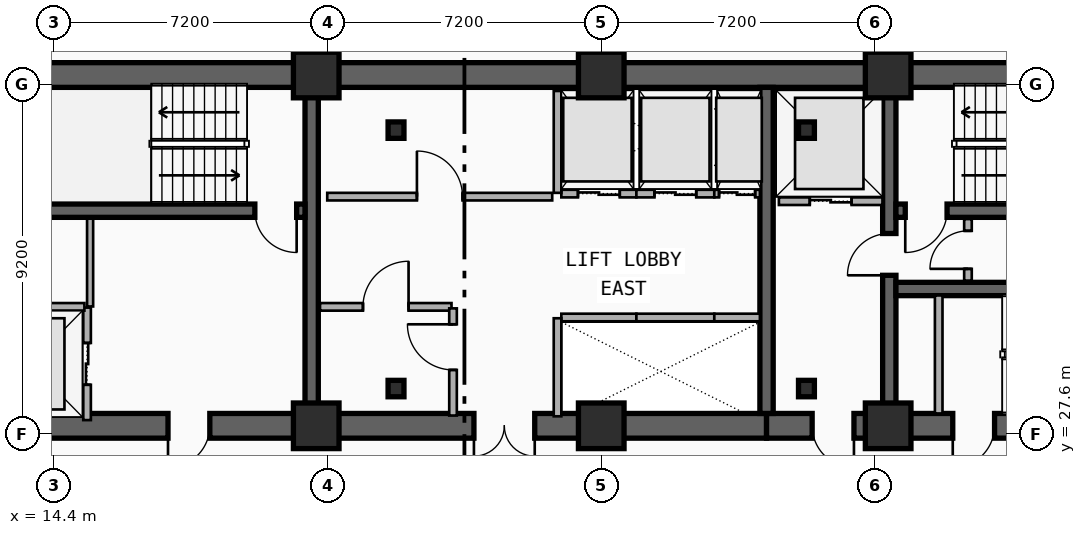
"""IFC4 building model, lengths in metres.
Left out: names, types, materials, properties, quantities, classifications, styles, units other than length and angle.
Written with IfcOpenShell. Run it as: python <this file> out.ifc"""

import sys

from ifc_helpers import new_model, si_unit, direction, frame, frame_2d, origin, origin_2d, place, context, subcontext, project, spatial, rectangle, i_section, extrude, element, fill, save


model = new_model("IFC4")
c1 = context("Model", 3, precision=1e-05, world=origin(), true_north=direction((0.0, 1.0)))
c2 = subcontext(c1, "Body", "Model", "MODEL_VIEW")
j1 = project(units=[si_unit("LENGTHUNIT", "METRE"), si_unit("PLANEANGLEUNIT", "RADIAN")], contexts=[c1])
p1 = place(None, origin())
s1 = spatial("IfcSite", under=j1, at=p1, CompositionType="ELEMENT")
p2 = place(p1, origin())
s2 = spatial("IfcBuilding", under=s1, at=p2, CompositionType="ELEMENT")
p3 = place(p2, frame((0.0, 0.0, 118.8)))
s3 = spatial("IfcBuildingStorey", under=s2, at=p3, CompositionType="ELEMENT", Elevation=118.8)
p4 = place(p3, frame((12.15, 37.05, 0.0), z_axis=(0.0, 0.0, 1.0), x_axis=(1.0, 0.0, 0.0)))
e1 = element("IfcWall", 1, at=p4, inside=s3, PredefinedType="SHEAR", context=c2, shape_type="SweptSolid", body=[
    extrude(rectangle(XDim=33.23, YDim=0.65, at=frame_2d((16.615, 0.0))), origin(), (0.0, 0.0, 1.0), 3.5),
])
p5 = place(p3, frame((21.18, 27.82, 0.0), z_axis=(0.0, 0.0, 1.0), x_axis=(-1.0, 0.0, 0.0)))
e2 = element("IfcWall", 2, at=p5, inside=s3, PredefinedType="SHEAR", context=c2, shape_type="SweptSolid", body=[
    extrude(rectangle(XDim=9.03, YDim=0.65, at=frame_2d((4.515, 0.0))), origin(), (0.0, 0.0, 1.0), 3.5),
])
p6 = place(p5, frame((2.68, 0.0, 0.0)))
e3 = element("IfcOpeningElement", 3, at=p6, cuts=e2, PredefinedType="OPENING", context=c2, shape_type="SweptSolid", body=[
    extrude(rectangle(XDim=1.1, YDim=2.15, at=frame_2d((0.55, 1.075))), frame((0.0, 0.335, 0.0), z_axis=(0.0, -1.0, 0.0), x_axis=(1.0, 0.0, 0.0)), (0.0, 0.0, 1.0), 0.67),
])
p7 = place(p3, frame((33.15, 27.82, 0.0), z_axis=(0.0, 0.0, 1.0), x_axis=(-1.0, 0.0, 0.0)))
e4 = element("IfcWall", 4, at=p7, inside=s3, PredefinedType="SHEAR", context=c2, shape_type="SweptSolid", body=[
    extrude(rectangle(XDim=11.97, YDim=0.65, at=frame_2d((5.985, 0.0))), origin(), (0.0, 0.0, 1.0), 3.5),
])
p8 = place(p7, frame((6.1, 0.0, 0.0)))
e5 = element("IfcOpeningElement", 5, at=p8, cuts=e4, PredefinedType="OPENING", context=c2, shape_type="SweptSolid", body=[
    extrude(rectangle(XDim=1.6, YDim=2.2, at=frame_2d((0.8, 1.1))), frame((0.0, 0.335, 0.0), z_axis=(0.0, -1.0, 0.0), x_axis=(1.0, 0.0, 0.0)), (0.0, 0.0, 1.0), 0.67),
])
p9 = place(p3, frame((45.38, 27.82, 0.0), z_axis=(0.0, 0.0, 1.0), x_axis=(-1.0, 0.0, 0.0)))
e6 = element("IfcWall", 6, at=p9, inside=s3, PredefinedType="SHEAR", context=c2, shape_type="SweptSolid", body=[
    extrude(rectangle(XDim=12.23, YDim=0.65, at=frame_2d((6.115, 0.0))), origin(), (0.0, 0.0, 1.0), 3.5),
])
p10 = place(p9, frame((9.93, 0.0, 0.0)))
e7 = element("IfcOpeningElement", 7, at=p10, cuts=e6, PredefinedType="OPENING", context=c2, shape_type="SweptSolid", body=[
    extrude(rectangle(XDim=1.1, YDim=2.15, at=frame_2d((0.55, 1.075))), frame((0.0, 0.335, 0.0), z_axis=(0.0, -1.0, 0.0), x_axis=(1.0, 0.0, 0.0)), (0.0, 0.0, 1.0), 0.67),
])
p11 = place(p9, frame((6.23, 0.0, 0.0)))
e8 = element("IfcOpeningElement", 8, at=p11, cuts=e6, PredefinedType="OPENING", context=c2, shape_type="SweptSolid", body=[
    extrude(rectangle(XDim=1.1, YDim=2.15, at=frame_2d((0.55, 1.075))), frame((0.0, 0.335, 0.0), z_axis=(0.0, -1.0, 0.0), x_axis=(1.0, 0.0, 0.0)), (0.0, 0.0, 1.0), 0.67),
])
for number, where, z_axis, x_axis in (
    (9, (21.18, 28.145, 0.0), (0.0, 0.0, 1.0), (0.0, 1.0, 0.0)),
    (10, (33.15, 28.145, 0.0), (0.0, 0.0, 1.0), (0.0, 1.0, 0.0)),
):
    element("IfcWall", number, at=place(p3, frame(where, z_axis=z_axis, x_axis=x_axis)), inside=s3, PredefinedType="SHEAR", context=c2, shape_type="SweptSolid", body=[
        extrude(rectangle(XDim=8.58, YDim=0.35, at=frame_2d((4.29, 0.0))), origin(), (0.0, 0.0, 1.0), 3.5),
    ])
p12 = place(p3, frame((36.38, 28.145, 0.0), z_axis=(0.0, 0.0, 1.0), x_axis=(0.0, 1.0, 0.0)))
e11 = element("IfcWall", 11, at=p12, inside=s3, PredefinedType="SHEAR", context=c2, shape_type="SweptSolid", body=[
    extrude(rectangle(XDim=8.58, YDim=0.35, at=frame_2d((4.29, 0.0))), origin(), (0.0, 0.0, 1.0), 3.5),
])
p13 = place(p12, frame((3.635, 0.0, 0.0)))
e12 = element("IfcOpeningElement", 12, at=p13, cuts=e11, PredefinedType="OPENING", context=c2, shape_type="SweptSolid", body=[
    extrude(rectangle(XDim=1.1, YDim=2.15, at=frame_2d((0.55, 1.075))), frame((0.0, 0.185, 0.0), z_axis=(0.0, -1.0, 0.0), x_axis=(1.0, 0.0, 0.0)), (0.0, 0.0, 1.0), 0.37),
])
p14 = place(p3, frame((21.005, 33.48, 0.0), z_axis=(0.0, 0.0, 1.0), x_axis=(-1.0, 0.0, 0.0)))
e13 = element("IfcWall", 13, at=p14, inside=s3, PredefinedType="SHEAR", context=c2, shape_type="SweptSolid", body=[
    extrude(rectangle(XDim=8.53, YDim=0.35, at=frame_2d((4.265, 0.0))), origin(), (0.0, 0.0, 1.0), 3.5),
])
p15 = place(p14, frame((0.22, 0.0, 0.0)))
e14 = element("IfcOpeningElement", 14, at=p15, cuts=e13, PredefinedType="OPENING", context=c2, shape_type="SweptSolid", body=[
    extrude(rectangle(XDim=1.1, YDim=2.15, at=frame_2d((0.55, 1.075))), frame((0.0, 0.185, 0.0), z_axis=(0.0, -1.0, 0.0), x_axis=(1.0, 0.0, 0.0)), (0.0, 0.0, 1.0), 0.37),
])
p16 = place(p3, frame((45.055, 33.48, 0.0), z_axis=(0.0, 0.0, 1.0), x_axis=(-1.0, 0.0, 0.0)))
e15 = element("IfcWall", 15, at=p16, inside=s3, PredefinedType="SHEAR", context=c2, shape_type="SweptSolid", body=[
    extrude(rectangle(XDim=8.5, YDim=0.35, at=frame_2d((4.25, 0.0))), origin(), (0.0, 0.0, 1.0), 3.5),
])
p17 = place(p16, frame((7.155, 0.0, 0.0)))
e16 = element("IfcOpeningElement", 16, at=p17, cuts=e15, PredefinedType="OPENING", context=c2, shape_type="SweptSolid", body=[
    extrude(rectangle(XDim=1.1, YDim=2.15, at=frame_2d((0.55, 1.075))), frame((0.0, 0.185, 0.0), z_axis=(0.0, -1.0, 0.0), x_axis=(1.0, 0.0, 0.0)), (0.0, 0.0, 1.0), 0.37),
])
p18 = place(p3, frame((36.555, 31.42, 0.0), z_axis=(0.0, 0.0, 1.0), x_axis=(1.0, 0.0, 0.0)))
e17 = element("IfcWall", 17, at=p18, inside=s3, PredefinedType="SHEAR", context=c2, shape_type="SweptSolid", body=[
    extrude(rectangle(XDim=8.5, YDim=0.35, at=frame_2d((4.25, 0.0))), origin(), (0.0, 0.0, 1.0), 3.5),
])
for number, where, z_axis, x_axis in (
    (18, (23.4, 28.8, 0.0), (0.0, 0.0, 1.0), (1.0, 0.0, 0.0)),
    (19, (34.2, 28.8, 0.0), (0.0, 0.0, 1.0), (1.0, 0.0, 0.0)),
    (20, (34.2, 35.6, 0.0), (0.0, 0.0, 1.0), (1.0, 0.0, 0.0)),
    (21, (23.4, 35.6, 0.0), (0.0, 0.0, 1.0), (1.0, 0.0, 0.0)),
):
    element("IfcColumn", number, at=place(p3, frame(where, z_axis=z_axis, x_axis=x_axis)), inside=s3, PredefinedType="COLUMN", context=c2, shape_type="SweptSolid", body=[
        extrude(i_section(OverallWidth=0.418, OverallDepth=0.432, WebThickness=0.035, FlangeThickness=0.056, FilletRadius=0.015, at=origin_2d()), origin(), (0.0, 0.0, 1.0), 3.5),
    ])
for number, where, z_axis, x_axis in (
    (22, (21.3, 27.82, 0.0), (0.0, 0.0, 1.0), (1.0, 0.0, 0.0)),
    (23, (21.3, 37.05, 0.0), (0.0, 0.0, 1.0), (1.0, 0.0, 0.0)),
    (24, (28.8, 27.82, 0.0), (0.0, 0.0, 1.0), (1.0, 0.0, 0.0)),
    (25, (28.8, 37.05, 0.0), (0.0, 0.0, 1.0), (1.0, 0.0, 0.0)),
    (26, (36.35, 27.82, 0.0), (0.0, 0.0, 1.0), (1.0, 0.0, 0.0)),
    (27, (36.35, 37.05, 0.0), (0.0, 0.0, 1.0), (1.0, 0.0, 0.0)),
):
    element("IfcColumn", number, at=place(p3, frame(where, z_axis=z_axis, x_axis=x_axis)), inside=s3, PredefinedType="COLUMN", context=c2, shape_type="SweptSolid", body=[
        extrude(rectangle(XDim=1.2, YDim=1.2, at=origin_2d()), origin(), (0.0, 0.0, 1.0), 3.5),
    ])
p19 = place(p3, frame((15.27, 27.97, 0.0), z_axis=(0.0, 0.0, 1.0), x_axis=(0.0, 1.0, 0.0)))
e28 = element("IfcWall", 28, at=p19, inside=s3, PredefinedType="PARTITIONING", context=c2, shape_type="SweptSolid", body=[
    extrude(rectangle(XDim=2.96, YDim=0.2, at=frame_2d((1.48, 0.0))), origin(), (0.0, 0.0, 1.0), 2.212),
])
p20 = place(p19, frame((0.93, 0.0, 0.0)))
e29 = element("IfcOpeningElement", 29, at=p20, cuts=e28, PredefinedType="OPENING", context=c2, shape_type="SweptSolid", body=[
    extrude(rectangle(XDim=1.1, YDim=2.15, at=frame_2d((0.55, 1.075))), frame((0.0, 0.11, 0.0), z_axis=(0.0, -1.0, 0.0), x_axis=(1.0, 0.0, 0.0)), (0.0, 0.0, 1.0), 0.22),
])
p21 = place(p3, frame((12.45, 30.95, 0.0), z_axis=(0.0, 0.0, 1.0), x_axis=(1.0, 0.0, 0.0)))
e30 = element("IfcWall", 30, at=p21, inside=s3, PredefinedType="PARTITIONING", context=c2, shape_type="SweptSolid", body=[
    extrude(rectangle(XDim=2.75, YDim=0.2, at=frame_2d((1.375, 0.0))), origin(), (0.0, 0.0, 1.0), 2.212),
])
p22 = place(p3, frame((33.475, 33.73, 0.0), z_axis=(0.0, 0.0, 1.0), x_axis=(1.0, 0.0, 0.0)))
e31 = element("IfcWall", 31, at=p22, inside=s3, PredefinedType="PARTITIONING", context=c2, shape_type="SweptSolid", body=[
    extrude(rectangle(XDim=2.725, YDim=0.2, at=frame_2d((1.362, 0.0))), origin(), (0.0, 0.0, 1.0), 2.212),
])
p23 = place(p22, frame((0.812, 0.0, 0.0)))
e32 = element("IfcOpeningElement", 32, at=p23, cuts=e31, PredefinedType="OPENING", context=c2, shape_type="SweptSolid", body=[
    extrude(rectangle(XDim=1.1, YDim=2.15, at=frame_2d((0.55, 1.075))), frame((0.0, 0.11, 0.0), z_axis=(0.0, -1.0, 0.0), x_axis=(1.0, 0.0, 0.0)), (0.0, 0.0, 1.0), 0.22),
])
p24 = place(p3, frame((27.75, 30.67, 0.0), z_axis=(0.0, 0.0, 1.0), x_axis=(1.0, 0.0, 0.0)))
e33 = element("IfcWall", 33, at=p24, inside=s3, PredefinedType="PARTITIONING", context=c2, shape_type="SweptSolid", body=[
    extrude(rectangle(XDim=1.975, YDim=0.2, at=frame_2d((0.988, 0.0))), origin(), (0.0, 0.0, 1.0), 2.212),
])
p25 = place(p3, frame((27.65, 28.07, 0.0), z_axis=(0.0, 0.0, 1.0), x_axis=(0.0, 1.0, 0.0)))
e34 = element("IfcWall", 34, at=p25, inside=s3, PredefinedType="PARTITIONING", context=c2, shape_type="SweptSolid", body=[
    extrude(rectangle(XDim=2.58, YDim=0.2, at=frame_2d((1.29, 0.0))), origin(), (0.0, 0.0, 1.0), 2.212),
])
p26 = place(p3, frame((29.725, 30.67, 0.0), z_axis=(0.0, 0.0, 1.0), x_axis=(1.0, 0.0, 0.0)))
e35 = element("IfcWall", 35, at=p26, inside=s3, PredefinedType="PARTITIONING", context=c2, shape_type="SweptSolid", body=[
    extrude(rectangle(XDim=2.05, YDim=0.2, at=frame_2d((1.025, 0.0))), origin(), (0.0, 0.0, 1.0), 2.62),
])
p27 = place(p3, frame((31.775, 30.67, 0.0), z_axis=(0.0, 0.0, 1.0), x_axis=(1.0, 0.0, 0.0)))
e36 = element("IfcWall", 36, at=p27, inside=s3, PredefinedType="PARTITIONING", context=c2, shape_type="SweptSolid", body=[
    extrude(rectangle(XDim=1.2, YDim=0.2, at=frame_2d((0.6, 0.0))), origin(), (0.0, 0.0, 1.0), 2.62),
])
p28 = place(p3, frame((27.75, 33.93, 0.0), z_axis=(0.0, 0.0, 1.0), x_axis=(1.0, 0.0, 0.0)))
e37 = element("IfcWall", 37, at=p28, inside=s3, PredefinedType="PARTITIONING", context=c2, shape_type="SweptSolid", body=[
    extrude(rectangle(XDim=1.975, YDim=0.2, at=frame_2d((0.988, 0.0))), origin(), (0.0, 0.0, 1.0), 2.212),
])
p29 = place(p28, frame((0.438, 0.0, 0.0)))
e38 = element("IfcOpeningElement", 38, at=p29, cuts=e37, PredefinedType="OPENING", context=c2, shape_type="SweptSolid", body=[
    extrude(rectangle(XDim=1.1, YDim=2.15, at=frame_2d((0.55, 1.075))), frame((0.0, 0.11, 0.0), z_axis=(0.0, -1.0, 0.0), x_axis=(1.0, 0.0, 0.0)), (0.0, 0.0, 1.0), 0.22),
])
p30 = place(p3, frame((27.65, 33.95, 0.0), z_axis=(0.0, 0.0, 1.0), x_axis=(0.0, 1.0, 0.0)))
e39 = element("IfcWall", 39, at=p30, inside=s3, PredefinedType="PARTITIONING", context=c2, shape_type="SweptSolid", body=[
    extrude(rectangle(XDim=2.68, YDim=0.2, at=frame_2d((1.34, 0.0))), origin(), (0.0, 0.0, 1.0), 2.212),
])
p31 = place(p3, frame((29.725, 33.93, 0.0), z_axis=(0.0, 0.0, 1.0), x_axis=(1.0, 0.0, 0.0)))
e40 = element("IfcWall", 40, at=p31, inside=s3, PredefinedType="PARTITIONING", context=c2, shape_type="SweptSolid", body=[
    extrude(rectangle(XDim=2.05, YDim=0.2, at=frame_2d((1.025, 0.0))), origin(), (0.0, 0.0, 1.0), 3.24),
])
p32 = place(p31, frame((0.475, 0.0, 0.0)))
e41 = element("IfcOpeningElement", 41, at=p32, cuts=e40, PredefinedType="OPENING", context=c2, shape_type="SweptSolid", body=[
    extrude(rectangle(XDim=1.1, YDim=2.15, at=frame_2d((0.55, 1.075))), frame((0.0, 0.11, 0.0), z_axis=(0.0, -1.0, 0.0), x_axis=(1.0, 0.0, 0.0)), (0.0, 0.0, 1.0), 0.22),
])
p33 = place(p3, frame((31.775, 33.93, 0.0), z_axis=(0.0, 0.0, 1.0), x_axis=(1.0, 0.0, 0.0)))
e42 = element("IfcWall", 42, at=p33, inside=s3, PredefinedType="PARTITIONING", context=c2, shape_type="SweptSolid", body=[
    extrude(rectangle(XDim=1.2, YDim=0.2, at=frame_2d((0.6, 0.0))), origin(), (0.0, 0.0, 1.0), 3.24),
])
p34 = place(p33, frame((0.125, 0.0, 0.0)))
e43 = element("IfcOpeningElement", 43, at=p34, cuts=e42, PredefinedType="OPENING", context=c2, shape_type="SweptSolid", body=[
    extrude(rectangle(XDim=0.95, YDim=2.15, at=frame_2d((0.475, 1.075))), frame((0.0, 0.11, 0.0), z_axis=(0.0, -1.0, 0.0), x_axis=(1.0, 0.0, 0.0)), (0.0, 0.0, 1.0), 0.22),
])
p35 = place(p3, frame((37.68, 28.145, 0.0), z_axis=(0.0, 0.0, 1.0), x_axis=(0.0, 1.0, 0.0)))
e44 = element("IfcWall", 44, at=p35, inside=s3, PredefinedType="PARTITIONING", context=c2, shape_type="SweptSolid", body=[
    extrude(rectangle(XDim=3.105, YDim=0.2, at=frame_2d((1.552, 0.0))), origin(), (0.0, 0.0, 1.0), 2.62),
])
p36 = place(p3, frame((38.45, 31.64, 0.0), z_axis=(0.0, 0.0, 1.0), x_axis=(0.0, 1.0, 0.0)))
e45 = element("IfcWall", 45, at=p36, inside=s3, PredefinedType="PARTITIONING", context=c2, shape_type="SweptSolid", body=[
    extrude(rectangle(XDim=1.62, YDim=0.2, at=frame_2d((0.81, 0.0))), origin(), (0.0, 0.0, 1.0), 3.24),
])
p37 = place(p36, frame((0.31, 0.0, 0.0)))
e46 = element("IfcOpeningElement", 46, at=p37, cuts=e45, PredefinedType="OPENING", context=c2, shape_type="SweptSolid", body=[
    extrude(rectangle(XDim=1.0, YDim=2.15, at=frame_2d((0.5, 1.075))), frame((0.0, 0.11, 0.0), z_axis=(0.0, -1.0, 0.0), x_axis=(1.0, 0.0, 0.0)), (0.0, 0.0, 1.0), 0.22),
])
p38 = place(p3, frame((21.4, 30.95, 0.0), z_axis=(0.0, 0.0, 1.0), x_axis=(1.0, 0.0, 0.0)))
e47 = element("IfcWall", 47, at=p38, inside=s3, PredefinedType="PARTITIONING", context=c2, shape_type="SweptSolid", body=[
    extrude(rectangle(XDim=3.46, YDim=0.2, at=frame_2d((1.73, 0.0))), origin(), (0.0, 0.0, 1.0), 2.28),
])
p39 = place(p38, frame((1.13, 0.0, 0.0)))
e48 = element("IfcOpeningElement", 48, at=p39, cuts=e47, PredefinedType="OPENING", context=c2, shape_type="SweptSolid", body=[
    extrude(rectangle(XDim=1.2, YDim=2.15, at=frame_2d((0.6, 1.075))), frame((0.0, 0.11, 0.0), z_axis=(0.0, -1.0, 0.0), x_axis=(1.0, 0.0, 0.0)), (0.0, 0.0, 1.0), 0.22),
])
p40 = place(p3, frame((21.59, 33.85, 0.0), z_axis=(0.0, 0.0, 1.0), x_axis=(1.0, 0.0, 0.0)))
e49 = element("IfcWall", 49, at=p40, inside=s3, PredefinedType="PARTITIONING", context=c2, shape_type="SweptSolid", body=[
    extrude(rectangle(XDim=5.92, YDim=0.2, at=frame_2d((2.96, 0.0))), origin(), (0.0, 0.0, 1.0), 2.28),
])
p41 = place(p40, frame((2.36, 0.0, 0.0)))
e50 = element("IfcOpeningElement", 50, at=p41, cuts=e49, PredefinedType="OPENING", context=c2, shape_type="SweptSolid", body=[
    extrude(rectangle(XDim=1.2, YDim=2.15, at=frame_2d((0.6, 1.075))), frame((0.0, 0.11, 0.0), z_axis=(0.0, -1.0, 0.0), x_axis=(1.0, 0.0, 0.0)), (0.0, 0.0, 1.0), 0.22),
])
p42 = place(p3, frame((24.9, 28.09, 0.0), z_axis=(0.0, 0.0, 1.0), x_axis=(0.0, 1.0, 0.0)))
e51 = element("IfcWall", 51, at=p42, inside=s3, PredefinedType="PARTITIONING", context=c2, shape_type="SweptSolid", body=[
    extrude(rectangle(XDim=2.82, YDim=0.2, at=frame_2d((1.41, 0.0))), origin(), (0.0, 0.0, 1.0), 2.62),
])
p43 = place(p42, frame((1.201, 0.0, 0.0)))
e52 = element("IfcOpeningElement", 52, at=p43, cuts=e51, PredefinedType="OPENING", context=c2, shape_type="SweptSolid", body=[
    extrude(rectangle(XDim=1.2, YDim=2.15, at=frame_2d((0.6, 1.075))), frame((0.0, 0.11, 0.0), z_axis=(0.0, -1.0, 0.0), x_axis=(1.0, 0.0, 0.0)), (0.0, 0.0, 1.0), 0.22),
])
p44 = place(p3, frame((15.35, 30.96, 0.0), z_axis=(0.0, 0.0, 1.0), x_axis=(0.0, 1.0, 0.0)))
e53 = element("IfcWall", 53, at=p44, inside=s3, PredefinedType="PARTITIONING", context=c2, shape_type="SweptSolid", body=[
    extrude(rectangle(XDim=2.31, YDim=0.16, at=frame_2d((1.155, 0.0))), origin(), (0.0, 0.0, 1.0), 3.24),
])
p45 = place(p20, origin())
e54 = element("IfcDoor", 54, at=p45, inside=s3, OperationType="DOUBLE_DOOR_SLIDING", PredefinedType="DOOR", context=c2, shape_type="SweptSolid", body=[
    extrude(rectangle(XDim=1.1, YDim=2.15, at=frame_2d((0.55, 1.075))), frame((0.0, 0.025, 0.0), z_axis=(0.0, -1.0, 0.0), x_axis=(1.0, 0.0, 0.0)), (0.0, 0.0, 1.0), 0.05),
])
fill(e29, e54)
p46 = place(p23, origin())
e55 = element("IfcDoor", 55, at=p46, inside=s3, OperationType="DOUBLE_DOOR_SLIDING", PredefinedType="DOOR", context=c2, shape_type="SweptSolid", body=[
    extrude(rectangle(XDim=1.1, YDim=2.15, at=frame_2d((0.55, 1.075))), frame((0.0, 0.025, 0.0), z_axis=(0.0, -1.0, 0.0), x_axis=(1.0, 0.0, 0.0)), (0.0, 0.0, 1.0), 0.05),
])
fill(e32, e55)
p47 = place(p29, origin())
e56 = element("IfcDoor", 56, at=p47, inside=s3, OperationType="DOUBLE_DOOR_SLIDING", PredefinedType="DOOR", context=c2, shape_type="SweptSolid", body=[
    extrude(rectangle(XDim=1.1, YDim=2.15, at=frame_2d((0.55, 1.075))), frame((0.0, 0.025, 0.0), z_axis=(0.0, -1.0, 0.0), x_axis=(1.0, 0.0, 0.0)), (0.0, 0.0, 1.0), 0.05),
])
fill(e38, e56)
p48 = place(p32, origin())
e57 = element("IfcDoor", 57, at=p48, inside=s3, OperationType="DOUBLE_DOOR_SLIDING", PredefinedType="DOOR", context=c2, shape_type="SweptSolid", body=[
    extrude(rectangle(XDim=1.1, YDim=2.15, at=frame_2d((0.55, 1.075))), frame((0.0, 0.025, 0.0), z_axis=(0.0, -1.0, 0.0), x_axis=(1.0, 0.0, 0.0)), (0.0, 0.0, 1.0), 0.05),
])
fill(e41, e57)
p49 = place(p34, origin())
e58 = element("IfcDoor", 58, at=p49, inside=s3, OperationType="DOUBLE_DOOR_SLIDING", PredefinedType="DOOR", context=c2, shape_type="SweptSolid", body=[
    extrude(rectangle(XDim=0.95, YDim=2.15, at=frame_2d((0.475, 1.075))), frame((0.0, 0.025, 0.0), z_axis=(0.0, -1.0, 0.0), x_axis=(1.0, 0.0, 0.0)), (0.0, 0.0, 1.0), 0.05),
])
fill(e43, e58)
p50 = place(p15, origin())
e59 = element("IfcDoor", 59, at=p50, inside=s3, OperationType="SINGLE_SWING_LEFT", PredefinedType="DOOR", context=c2, shape_type="SweptSolid", body=[
    extrude(rectangle(XDim=1.1, YDim=2.15, at=frame_2d((0.55, 1.075))), frame((0.0, 0.025, 0.0), z_axis=(0.0, -1.0, 0.0), x_axis=(1.0, 0.0, 0.0)), (0.0, 0.0, 1.0), 0.05),
])
fill(e14, e59)
p51 = place(p6, origin())
e60 = element("IfcDoor", 60, at=p51, inside=s3, OperationType="SINGLE_SWING_RIGHT", PredefinedType="DOOR", context=c2, shape_type="SweptSolid", body=[
    extrude(rectangle(XDim=1.1, YDim=2.15, at=frame_2d((0.55, 1.075))), frame((0.0, 0.025, 0.0), z_axis=(0.0, -1.0, 0.0), x_axis=(1.0, 0.0, 0.0)), (0.0, 0.0, 1.0), 0.05),
])
fill(e3, e60)
p52 = place(p17, origin())
e61 = element("IfcDoor", 61, at=p52, inside=s3, OperationType="SINGLE_SWING_RIGHT", PredefinedType="DOOR", context=c2, shape_type="SweptSolid", body=[
    extrude(rectangle(XDim=1.1, YDim=2.15, at=frame_2d((0.55, 1.075))), frame((0.0, 0.025, 0.0), z_axis=(0.0, -1.0, 0.0), x_axis=(1.0, 0.0, 0.0)), (0.0, 0.0, 1.0), 0.05),
])
fill(e16, e61)
p53 = place(p13, origin())
e62 = element("IfcDoor", 62, at=p53, inside=s3, OperationType="SINGLE_SWING_LEFT", PredefinedType="DOOR", context=c2, shape_type="SweptSolid", body=[
    extrude(rectangle(XDim=1.1, YDim=2.15, at=frame_2d((0.55, 1.075))), frame((0.0, 0.025, 0.0), z_axis=(0.0, -1.0, 0.0), x_axis=(1.0, 0.0, 0.0)), (0.0, 0.0, 1.0), 0.05),
])
fill(e12, e62)
p54 = place(p10, origin())
e63 = element("IfcDoor", 63, at=p54, inside=s3, OperationType="SINGLE_SWING_LEFT", PredefinedType="DOOR", context=c2, shape_type="SweptSolid", body=[
    extrude(rectangle(XDim=1.1, YDim=2.15, at=frame_2d((0.55, 1.075))), frame((0.0, 0.025, 0.0), z_axis=(0.0, -1.0, 0.0), x_axis=(1.0, 0.0, 0.0)), (0.0, 0.0, 1.0), 0.05),
])
fill(e7, e63)
p55 = place(p11, origin())
e64 = element("IfcDoor", 64, at=p55, inside=s3, OperationType="SINGLE_SWING_RIGHT", PredefinedType="DOOR", context=c2, shape_type="SweptSolid", body=[
    extrude(rectangle(XDim=1.1, YDim=2.15, at=frame_2d((0.55, 1.075))), frame((0.0, 0.025, 0.0), z_axis=(0.0, -1.0, 0.0), x_axis=(1.0, 0.0, 0.0)), (0.0, 0.0, 1.0), 0.05),
])
fill(e8, e64)
p56 = place(p8, origin())
e65 = element("IfcDoor", 65, at=p56, inside=s3, OperationType="SINGLE_SWING_LEFT", PredefinedType="DOOR", context=c2, shape_type="SweptSolid", body=[
    extrude(rectangle(XDim=1.6, YDim=2.2, at=frame_2d((0.8, 1.1))), frame((0.0, 0.025, 0.0), z_axis=(0.0, -1.0, 0.0), x_axis=(1.0, 0.0, 0.0)), (0.0, 0.0, 1.0), 0.05),
])
fill(e5, e65)
p57 = place(p37, origin())
e66 = element("IfcDoor", 66, at=p57, inside=s3, OperationType="SINGLE_SWING_LEFT", PredefinedType="DOOR", context=c2, shape_type="SweptSolid", body=[
    extrude(rectangle(XDim=1.0, YDim=2.15, at=frame_2d((0.5, 1.075))), frame((0.0, 0.025, 0.0), z_axis=(0.0, -1.0, 0.0), x_axis=(1.0, 0.0, 0.0)), (0.0, 0.0, 1.0), 0.05),
])
fill(e46, e66)
p58 = place(p39, origin())
e67 = element("IfcDoor", 67, at=p58, inside=s3, OperationType="SINGLE_SWING_RIGHT", PredefinedType="DOOR", context=c2, shape_type="SweptSolid", body=[
    extrude(rectangle(XDim=1.2, YDim=2.15, at=frame_2d((0.6, 1.075))), frame((0.0, 0.025, 0.0), z_axis=(0.0, -1.0, 0.0), x_axis=(1.0, 0.0, 0.0)), (0.0, 0.0, 1.0), 0.05),
])
fill(e48, e67)
p59 = place(p41, origin())
e68 = element("IfcDoor", 68, at=p59, inside=s3, OperationType="SINGLE_SWING_LEFT", PredefinedType="DOOR", context=c2, shape_type="SweptSolid", body=[
    extrude(rectangle(XDim=1.2, YDim=2.15, at=frame_2d((0.6, 1.075))), frame((0.0, 0.025, 0.0), z_axis=(0.0, -1.0, 0.0), x_axis=(1.0, 0.0, 0.0)), (0.0, 0.0, 1.0), 0.05),
])
fill(e50, e68)
p60 = place(p43, origin())
e69 = element("IfcDoor", 69, at=p60, inside=s3, OperationType="SINGLE_SWING_RIGHT", PredefinedType="DOOR", context=c2, shape_type="SweptSolid", body=[
    extrude(rectangle(XDim=1.2, YDim=2.15, at=frame_2d((0.6, 1.075))), frame((0.0, 0.025, 0.0), z_axis=(0.0, -1.0, 0.0), x_axis=(1.0, 0.0, 0.0)), (0.0, 0.0, 1.0), 0.05),
])
fill(e52, e69)
save(model, sys.argv[1])
